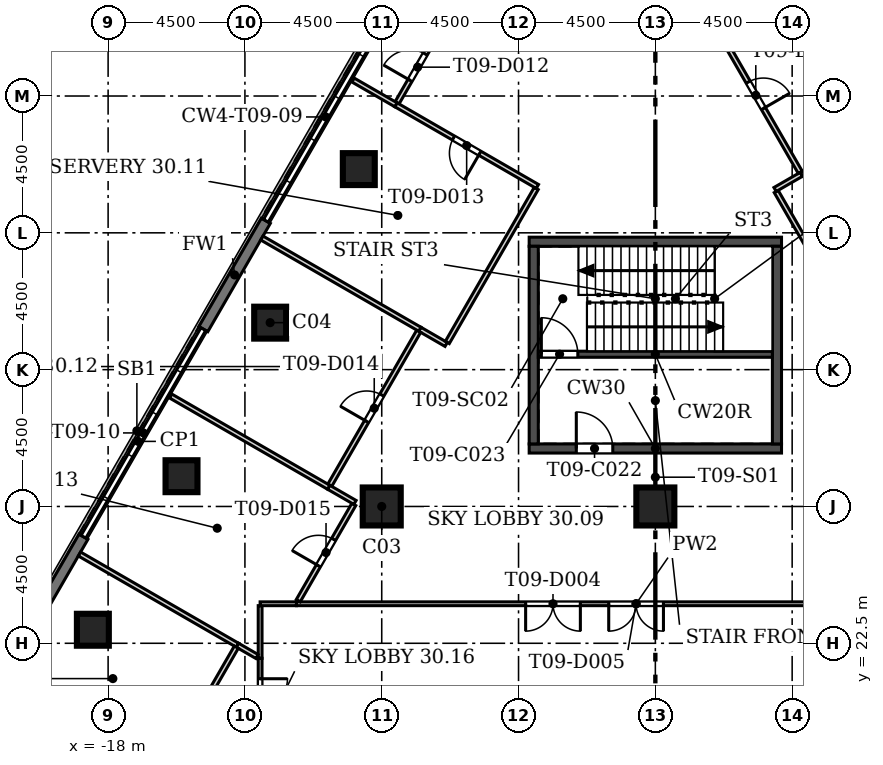
"""IFC4 building model, lengths in metres.
Left out: names, types, materials, properties, quantities, classifications, styles, units other than length and angle.
Written with IfcOpenShell. Run it as: python <this file> out.ifc"""

import sys

from ifc_helpers import new_model, si_unit, direction, frame, frame_2d, origin, origin_2d, place, context, subcontext, project, spatial, rectangle, extrude, element, fill, save


model = new_model("IFC4")
c1 = context("Model", 3, precision=1e-05, world=origin(), true_north=direction((0.0, 1.0)))
c2 = subcontext(c1, "Body", "Model", "MODEL_VIEW")
j1 = project(units=[si_unit("LENGTHUNIT", "METRE"), si_unit("PLANEANGLEUNIT", "RADIAN")], contexts=[c1])
p1 = place(None, origin())
s1 = spatial("IfcSite", under=j1, at=p1, CompositionType="ELEMENT")
p2 = place(p1, origin())
s2 = spatial("IfcBuilding", under=s1, at=p2, CompositionType="ELEMENT")
p3 = place(p2, frame((0.0, 0.0, 137.5)))
s3 = spatial("IfcBuildingStorey", under=s2, at=p3, CompositionType="ELEMENT", Elevation=137.5)
for number, where, z_axis, x_axis in (
    (1, (-9.754, 38.096, 0.0), (0.0, 0.0, 1.0), (1.0, 0.0, 0.0)),
    (2, (-12.67, 33.046, 0.0), (0.0, 0.0, 1.0), (1.0, 0.0, 0.0)),
    (3, (-15.586, 27.995, 0.0), (0.0, 0.0, 1.0), (1.0, 0.0, 0.0)),
    (4, (-18.502, 22.945, 0.0), (0.0, 0.0, 1.0), (1.0, 0.0, 0.0)),
):
    element("IfcColumn", number, at=place(p3, frame(where, z_axis=z_axis, x_axis=x_axis)), inside=s3, PredefinedType="COLUMN", context=c2, shape_type="SweptSolid", body=[
        extrude(rectangle(XDim=1.05, YDim=1.05, at=origin_2d()), origin(), (0.0, 0.0, 1.0), 5.4),
    ])
for number, where, z_axis, x_axis in (
    (5, (-9.0, 27.0, 0.0), (0.0, 0.0, 1.0), (1.0, 0.0, 0.0)),
    (6, (0.0, 27.0, 0.0), (0.0, 0.0, 1.0), (1.0, 0.0, 0.0)),
):
    element("IfcColumn", number, at=place(p3, frame(where, z_axis=z_axis, x_axis=x_axis)), inside=s3, PredefinedType="COLUMN", context=c2, shape_type="SweptSolid", body=[
        extrude(rectangle(XDim=1.25, YDim=1.25, at=origin_2d()), origin(), (0.0, 0.0, 1.0), 5.4),
    ])
for number, where, z_axis, x_axis in (
    (7, (-12.811, 36.397, 0.0), (0.0, 0.0, 1.0), (-0.5, -0.866, 0.0)),
    (8, (-18.811, 26.004, 0.0), (0.0, 0.0, 1.0), (-0.5, -0.866, 0.0)),
):
    element("IfcWall", number, at=place(p3, frame(where, z_axis=z_axis, x_axis=x_axis)), inside=s3, PredefinedType="SOLIDWALL", context=c2, shape_type="SweptSolid", body=[
        extrude(rectangle(XDim=4.115, YDim=0.34, at=frame_2d((2.058, 0.0))), origin(), (0.0, 0.0, 1.0), 5.0),
    ])
p4 = place(p3, frame((-4.15, 28.907, -0.4), z_axis=(0.0, 0.0, 1.0), x_axis=(1.0, 0.0, 0.0)))
e9 = element("IfcWall", 9, at=p4, inside=s3, PredefinedType="SOLIDWALL", context=c2, shape_type="SweptSolid", body=[
    extrude(rectangle(XDim=8.3, YDim=0.3, at=frame_2d((4.15, 0.0))), origin(), (0.0, 0.0, 1.0), 5.4),
])
p5 = place(p4, frame((1.55, 0.0, 0.4)))
e10 = element("IfcOpeningElement", 10, at=p5, cuts=e9, PredefinedType="OPENING", context=c2, shape_type="SweptSolid", body=[
    extrude(rectangle(XDim=1.2, YDim=2.1, at=frame_2d((0.6, 1.05))), frame((0.0, 0.16, 0.0), z_axis=(0.0, -1.0, 0.0), x_axis=(1.0, 0.0, 0.0)), (0.0, 0.0, 1.0), 0.32),
])
p6 = place(p3, frame((-4.15, 35.707, -0.4), z_axis=(0.0, 0.0, 1.0), x_axis=(1.0, 0.0, 0.0)))
e11 = element("IfcWall", 11, at=p6, inside=s3, PredefinedType="SOLIDWALL", context=c2, shape_type="SweptSolid", body=[
    extrude(rectangle(XDim=8.3, YDim=0.3, at=frame_2d((4.15, 0.0))), origin(), (0.0, 0.0, 1.0), 5.4),
])
for number, where, z_axis, x_axis in (
    (12, (-4.0, 29.057, -0.4), (0.0, 0.0, 1.0), (0.0, 1.0, 0.0)),
    (13, (4.0, 29.057, -0.4), (0.0, 0.0, 1.0), (0.0, 1.0, 0.0)),
):
    element("IfcWall", number, at=place(p3, frame(where, z_axis=z_axis, x_axis=x_axis)), inside=s3, PredefinedType="SOLIDWALL", context=c2, shape_type="SweptSolid", body=[
        extrude(rectangle(XDim=6.5, YDim=0.3, at=frame_2d((3.25, 0.0))), origin(), (0.0, 0.0, 1.0), 5.4),
    ])
p7 = place(p3, frame((-3.85, 32.007, -0.4), z_axis=(0.0, 0.0, 1.0), x_axis=(1.0, 0.0, 0.0)))
e14 = element("IfcWall", 14, at=p7, inside=s3, PredefinedType="SOLIDWALL", context=c2, shape_type="SweptSolid", body=[
    extrude(rectangle(XDim=7.7, YDim=0.2, at=frame_2d((3.85, 0.0))), origin(), (0.0, 0.0, 1.0), 5.4),
])
p8 = place(p7, frame((0.1, 0.0, 0.4)))
e15 = element("IfcOpeningElement", 15, at=p8, cuts=e14, PredefinedType="OPENING", context=c2, shape_type="SweptSolid", body=[
    extrude(rectangle(XDim=1.2, YDim=2.1, at=frame_2d((0.6, 1.05))), frame((0.0, 0.11, 0.0), z_axis=(0.0, -1.0, 0.0), x_axis=(1.0, 0.0, 0.0)), (0.0, 0.0, 1.0), 0.22),
])
p9 = place(p3, frame((-11.804, 23.8, 0.0), z_axis=(0.0, 0.0, 1.0), x_axis=(1.0, 0.0, 0.0)))
e16 = element("IfcWall", 16, at=p9, inside=s3, PredefinedType="PARTITIONING", context=c2, shape_type="SweptSolid", body=[
    extrude(rectangle(XDim=22.342, YDim=0.125, at=frame_2d((11.171, 0.0))), origin(), (0.0, 0.0, 1.0), 5.0),
])
p10 = place(p9, frame((7.538, 0.0, 0.0)))
e17 = element("IfcOpeningElement", 17, at=p10, cuts=e16, PredefinedType="OPENING", context=c2, shape_type="SweptSolid", body=[
    extrude(rectangle(XDim=1.8, YDim=2.1, at=frame_2d((0.9, 1.05))), frame((0.0, 0.073, 0.0), z_axis=(0.0, -1.0, 0.0), x_axis=(1.0, 0.0, 0.0)), (0.0, 0.0, 1.0), 0.145),
])
p11 = place(p9, frame((10.271, 0.0, 0.0)))
e18 = element("IfcOpeningElement", 18, at=p11, cuts=e16, PredefinedType="OPENING", context=c2, shape_type="SweptSolid", body=[
    extrude(rectangle(XDim=1.8, YDim=2.1, at=frame_2d((0.9, 1.05))), frame((0.0, 0.073, 0.0), z_axis=(0.0, -1.0, 0.0), x_axis=(1.0, 0.0, 0.0)), (0.0, 0.0, 1.0), 0.145),
])
p12 = place(p3, frame((-13.0, 22.006, 0.0), z_axis=(0.0, 0.0, 1.0), x_axis=(0.0, 1.0, 0.0)))
e19 = element("IfcWall", 19, at=p12, inside=s3, PredefinedType="PARTITIONING", context=c2, shape_type="SweptSolid", body=[
    extrude(rectangle(XDim=1.732, YDim=0.125, at=frame_2d((0.866, 0.0))), origin(), (0.0, 0.0, 1.0), 5.0),
])
p13 = place(p3, frame((-13.0, 23.8, 0.0), z_axis=(0.0, 0.0, 1.0), x_axis=(1.0, 0.0, 0.0)))
e20 = element("IfcWall", 20, at=p13, inside=s3, PredefinedType="PARTITIONING", context=c2, shape_type="SweptSolid", body=[
    extrude(rectangle(XDim=1.196, YDim=0.125, at=frame_2d((0.598, 0.0))), origin(), (0.0, 0.0, 1.0), 5.0),
])
p14 = place(p3, frame((-13.0, 18.863, 0.0), z_axis=(0.0, 0.0, 1.0), x_axis=(0.0, 1.0, 0.0)))
e21 = element("IfcWall", 21, at=p14, inside=s3, PredefinedType="PARTITIONING", context=c2, shape_type="SweptSolid", body=[
    extrude(rectangle(XDim=3.143, YDim=0.125, at=frame_2d((1.572, 0.0))), origin(), (0.0, 0.0, 1.0), 5.0),
])
p15 = place(p14, frame((0.672, 0.0, 0.0)))
e22 = element("IfcOpeningElement", 22, at=p15, cuts=e21, PredefinedType="OPENING", context=c2, shape_type="SweptSolid", body=[
    extrude(rectangle(XDim=1.8, YDim=2.1, at=frame_2d((0.9, 1.05))), frame((0.0, 0.073, 0.0), z_axis=(0.0, -1.0, 0.0), x_axis=(1.0, 0.0, 0.0)), (0.0, 0.0, 1.0), 0.145),
])
p16 = place(p3, frame((4.804, 37.925, 0.0), z_axis=(0.0, 0.0, 1.0), x_axis=(0.866031096941, 0.499990139034, 0.0)))
e23 = element("IfcWall", 23, at=p16, inside=s3, PredefinedType="PARTITIONING", context=c2, shape_type="SweptSolid", body=[
    extrude(rectangle(XDim=6.0, YDim=0.15, at=frame_2d((3.0, 0.0))), origin(), (0.0, 0.0, 1.0), 5.0),
])
p17 = place(p3, frame((6.938, 32.229, 0.0), z_axis=(0.0, 0.0, 1.0), x_axis=(-0.499994727438, 0.866028447878, 0.0)))
e24 = element("IfcWall", 24, at=p17, inside=s3, PredefinedType="PARTITIONING", context=c2, shape_type="SweptSolid", body=[
    extrude(rectangle(XDim=5.925, YDim=0.15, at=frame_2d((2.962, 0.0))), origin(), (0.0, 0.0, 1.0), 5.0),
])
p18 = place(p17, frame((2.261, 0.0, 0.0)))
e25 = element("IfcOpeningElement", 25, at=p18, cuts=e24, PredefinedType="OPENING", context=c2, shape_type="SweptSolid", body=[
    extrude(rectangle(XDim=1.0, YDim=2.1, at=frame_2d((0.5, 1.05))), frame((0.0, 0.085, 0.0), z_axis=(0.0, -1.0, 0.0), x_axis=(1.0, 0.0, 0.0)), (0.0, 0.0, 1.0), 0.17),
])
p19 = place(p3, frame((3.938, 37.425, 0.0), z_axis=(0.0, 0.0, 1.0), x_axis=(0.866010750942, 0.50002537861, 0.0)))
e26 = element("IfcWall", 26, at=p19, inside=s3, PredefinedType="PARTITIONING", context=c2, shape_type="SweptSolid", body=[
    extrude(rectangle(XDim=1.0, YDim=0.15, at=frame_2d((0.5, 0.0))), origin(), (0.0, 0.0, 1.0), 5.0),
])
p20 = place(p3, frame((4.766, 37.99, 0.0), z_axis=(0.0, 0.0, 1.0), x_axis=(-0.500012662943, 0.866018092707, 0.0)))
e27 = element("IfcWall", 27, at=p20, inside=s3, PredefinedType="PARTITIONING", context=c2, shape_type="SweptSolid", body=[
    extrude(rectangle(XDim=5.85, YDim=0.15, at=frame_2d((2.925, 0.0))), origin(), (0.0, 0.0, 1.0), 5.0),
])
p21 = place(p20, frame((2.425, 0.0, 0.0)))
e28 = element("IfcOpeningElement", 28, at=p21, cuts=e27, PredefinedType="OPENING", context=c2, shape_type="SweptSolid", body=[
    extrude(rectangle(XDim=1.0, YDim=2.1, at=frame_2d((0.5, 1.05))), frame((0.0, 0.085, 0.0), z_axis=(0.0, -1.0, 0.0), x_axis=(1.0, 0.0, 0.0)), (0.0, 0.0, 1.0), 0.17),
])
p22 = place(p3, frame((-8.496, 40.276, 0.0), z_axis=(0.0, 0.0, 1.0), x_axis=(0.500037236202, 0.866003904386, 0.0)))
e29 = element("IfcWall", 29, at=p22, inside=s3, PredefinedType="PARTITIONING", context=c2, shape_type="SweptSolid", body=[
    extrude(rectangle(XDim=2.708, YDim=0.15, at=frame_2d((1.354, 0.0))), origin(), (0.0, 0.0, 1.0), 4.2),
])
p23 = place(p22, frame((0.854, 0.0, 0.0)))
e30 = element("IfcOpeningElement", 30, at=p23, cuts=e29, PredefinedType="OPENING", context=c2, shape_type="SweptSolid", body=[
    extrude(rectangle(XDim=1.0, YDim=2.1, at=frame_2d((0.5, 1.05))), frame((0.0, 0.085, 0.0), z_axis=(0.0, -1.0, 0.0), x_axis=(1.0, 0.0, 0.0)), (0.0, 0.0, 1.0), 0.17),
])
p24 = place(p3, frame((-7.746, 32.829, 0.0), z_axis=(0.0, 0.0, 1.0), x_axis=(0.866010750942, -0.50002537861, 0.0)))
e31 = element("IfcWall", 31, at=p24, inside=s3, PredefinedType="PARTITIONING", context=c2, shape_type="SweptSolid", body=[
    extrude(rectangle(XDim=1.0, YDim=0.15, at=frame_2d((0.5, 0.0))), origin(), (0.0, 0.0, 1.0), 5.0),
])
p25 = place(p3, frame((-6.843, 32.394, 0.0), z_axis=(0.0, 0.0, 1.0), x_axis=(0.500012662943, 0.866018092707, 0.0)))
e32 = element("IfcWall", 32, at=p25, inside=s3, PredefinedType="PARTITIONING", context=c2, shape_type="SweptSolid", body=[
    extrude(rectangle(XDim=5.85, YDim=0.15, at=frame_2d((2.925, 0.0))), origin(), (0.0, 0.0, 1.0), 5.0),
])
p26 = place(p3, frame((-3.88, 37.525, 0.0), z_axis=(0.0, 0.0, 1.0), x_axis=(-0.866016825791, 0.500014857227, 0.0)))
e33 = element("IfcWall", 33, at=p26, inside=s3, PredefinedType="PARTITIONING", context=c2, shape_type="SweptSolid", body=[
    extrude(rectangle(XDim=5.372, YDim=0.15, at=frame_2d((2.686, 0.0))), origin(), (0.0, 0.0, 1.0), 5.0),
])
p27 = place(p26, frame((2.186, 0.0, 0.0)))
e34 = element("IfcOpeningElement", 34, at=p27, cuts=e33, PredefinedType="OPENING", context=c2, shape_type="SweptSolid", body=[
    extrude(rectangle(XDim=1.0, YDim=2.1, at=frame_2d((0.5, 1.05))), frame((0.0, 0.085, 0.0), z_axis=(0.0, -1.0, 0.0), x_axis=(1.0, 0.0, 0.0)), (0.0, 0.0, 1.0), 0.17),
])
p28 = place(p3, frame((-10.709, 27.698, 0.0), z_axis=(0.0, 0.0, 1.0), x_axis=(0.500012662943, 0.866018092707, 0.0)))
e35 = element("IfcWall", 35, at=p28, inside=s3, PredefinedType="PARTITIONING", context=c2, shape_type="SweptSolid", body=[
    extrude(rectangle(XDim=5.85, YDim=0.15, at=frame_2d((2.925, 0.0))), origin(), (0.0, 0.0, 1.0), 5.0),
])
p29 = place(p28, frame((2.425, 0.0, 0.0)))
e36 = element("IfcOpeningElement", 36, at=p29, cuts=e35, PredefinedType="OPENING", context=c2, shape_type="SweptSolid", body=[
    extrude(rectangle(XDim=1.0, YDim=2.1, at=frame_2d((0.5, 1.05))), frame((0.0, 0.085, 0.0), z_axis=(0.0, -1.0, 0.0), x_axis=(1.0, 0.0, 0.0)), (0.0, 0.0, 1.0), 0.17),
])
p30 = place(p3, frame((-11.746, 23.9, 0.0), z_axis=(0.0, 0.0, 1.0), x_axis=(0.500001750229, 0.866024393287, 0.0)))
e37 = element("IfcWall", 37, at=p30, inside=s3, PredefinedType="PARTITIONING", context=c2, shape_type="SweptSolid", body=[
    extrude(rectangle(XDim=3.657, YDim=0.15, at=frame_2d((1.829, 0.0))), origin(), (0.0, 0.0, 1.0), 5.0),
])
p31 = place(p30, frame((1.329, 0.0, 0.0)))
e38 = element("IfcOpeningElement", 38, at=p31, cuts=e37, PredefinedType="OPENING", context=c2, shape_type="SweptSolid", body=[
    extrude(rectangle(XDim=1.0, YDim=2.1, at=frame_2d((0.5, 1.05))), frame((0.0, 0.085, 0.0), z_axis=(0.0, -1.0, 0.0), x_axis=(1.0, 0.0, 0.0)), (0.0, 0.0, 1.0), 0.17),
])
p32 = place(p3, frame((-9.88, 27.133, 0.0), z_axis=(0.0, 0.0, 1.0), x_axis=(-0.866010750942, 0.50002537861, 0.0)))
e39 = element("IfcWall", 39, at=p32, inside=s3, PredefinedType="PARTITIONING", context=c2, shape_type="SweptSolid", body=[
    extrude(rectangle(XDim=1.0, YDim=0.15, at=frame_2d((0.5, 0.0))), origin(), (0.0, 0.0, 1.0), 5.0),
])
p33 = place(p3, frame((-8.533, 40.211, 0.0), z_axis=(0.0, 0.0, 1.0), x_axis=(-0.866028203713, 0.499995150351, 0.0)))
e40 = element("IfcWall", 40, at=p33, inside=s3, PredefinedType="PARTITIONING", context=c2, shape_type="SweptSolid", body=[
    extrude(rectangle(XDim=1.627, YDim=0.15, at=frame_2d((0.814, 0.0))), origin(), (0.0, 0.0, 1.0), 5.0),
])
for number, where, z_axis, x_axis in (
    (41, (-7.746, 32.829, 0.0), (0.0, 0.0, 1.0), (-0.866, 0.5, 0.0)),
    (42, (-10.746, 27.633, 0.0), (0.0, 0.0, 1.0), (-0.866, 0.5, 0.0)),
    (43, (-13.746, 22.437, 0.0), (0.0, 0.0, 1.0), (-0.866, 0.5, 0.0)),
):
    element("IfcWall", number, at=place(p3, frame(where, z_axis=z_axis, x_axis=x_axis)), inside=s3, PredefinedType="PARTITIONING", context=c2, shape_type="SweptSolid", body=[
        extrude(rectangle(XDim=6.0, YDim=0.15, at=frame_2d((3.0, 0.0))), origin(), (0.0, 0.0, 1.0), 5.0),
    ])
p34 = place(p3, frame((-13.1, 22.064, 0.0), z_axis=(0.0, 0.0, 1.0), x_axis=(-0.866120184914, 0.499835798323, 0.0)))
e44 = element("IfcWall", 44, at=p34, inside=s3, PredefinedType="PARTITIONING", context=c2, shape_type="SweptSolid", body=[
    extrude(rectangle(XDim=0.746, YDim=0.15, at=frame_2d((0.373, 0.0))), origin(), (0.0, 0.0, 1.0), 5.0),
])
p35 = place(p3, frame((-13.784, 22.372, 0.0), z_axis=(0.0, 0.0, 1.0), x_axis=(-0.500012662943, -0.866018092707, 0.0)))
e45 = element("IfcWall", 45, at=p35, inside=s3, PredefinedType="PARTITIONING", context=c2, shape_type="SweptSolid", body=[
    extrude(rectangle(XDim=5.85, YDim=0.15, at=frame_2d((2.925, 0.0))), origin(), (0.0, 0.0, 1.0), 5.0),
])
p36 = place(p35, frame((2.425, 0.0, 0.0)))
e46 = element("IfcOpeningElement", 46, at=p36, cuts=e45, PredefinedType="OPENING", context=c2, shape_type="SweptSolid", body=[
    extrude(rectangle(XDim=1.0, YDim=2.1, at=frame_2d((0.5, 1.05))), frame((0.0, 0.085, 0.0), z_axis=(0.0, -1.0, 0.0), x_axis=(1.0, 0.0, 0.0)), (0.0, 0.0, 1.0), 0.17),
])
p37 = place(p5, origin())
e47 = element("IfcDoor", 47, at=p37, inside=s3, OperationType="SINGLE_SWING_LEFT", PredefinedType="DOOR", context=c2, shape_type="SweptSolid", body=[
    extrude(rectangle(XDim=1.2, YDim=2.1, at=frame_2d((0.6, 1.05))), frame((0.0, 0.025, 0.0), z_axis=(0.0, -1.0, 0.0), x_axis=(1.0, 0.0, 0.0)), (0.0, 0.0, 1.0), 0.05),
])
fill(e10, e47)
p38 = place(p8, origin())
e48 = element("IfcDoor", 48, at=p38, inside=s3, OperationType="SINGLE_SWING_LEFT", PredefinedType="DOOR", context=c2, shape_type="SweptSolid", body=[
    extrude(rectangle(XDim=1.2, YDim=2.1, at=frame_2d((0.6, 1.05))), frame((0.0, 0.025, 0.0), z_axis=(0.0, -1.0, 0.0), x_axis=(1.0, 0.0, 0.0)), (0.0, 0.0, 1.0), 0.05),
])
fill(e15, e48)
p39 = place(p10, frame((1.8, 0.0, 0.0), z_axis=(0.0, 0.0, 1.0), x_axis=(-1.0, 0.0, 0.0)))
e49 = element("IfcDoor", 49, at=p39, inside=s3, OperationType="DOUBLE_DOOR_SINGLE_SWING", PredefinedType="DOOR", context=c2, shape_type="SweptSolid", body=[
    extrude(rectangle(XDim=1.8, YDim=2.1, at=frame_2d((0.9, 1.05))), frame((0.0, 0.025, 0.0), z_axis=(0.0, -1.0, 0.0), x_axis=(1.0, 0.0, 0.0)), (0.0, 0.0, 1.0), 0.05),
])
fill(e17, e49)
p40 = place(p11, frame((1.8, 0.0, 0.0), z_axis=(0.0, 0.0, 1.0), x_axis=(-1.0, 0.0, 0.0)))
e50 = element("IfcDoor", 50, at=p40, inside=s3, OperationType="DOUBLE_DOOR_SINGLE_SWING", PredefinedType="DOOR", context=c2, shape_type="SweptSolid", body=[
    extrude(rectangle(XDim=1.8, YDim=2.1, at=frame_2d((0.9, 1.05))), frame((0.0, 0.025, 0.0), z_axis=(0.0, -1.0, 0.0), x_axis=(1.0, 0.0, 0.0)), (0.0, 0.0, 1.0), 0.05),
])
fill(e18, e50)
p41 = place(p15, frame((1.8, 0.0, 0.0), z_axis=(0.0, 0.0, 1.0), x_axis=(-1.0, 0.0, 0.0)))
e51 = element("IfcDoor", 51, at=p41, inside=s3, OperationType="DOUBLE_DOOR_SINGLE_SWING", PredefinedType="DOOR", context=c2, shape_type="SweptSolid", body=[
    extrude(rectangle(XDim=1.8, YDim=2.1, at=frame_2d((0.9, 1.05))), frame((0.0, 0.025, 0.0), z_axis=(0.0, -1.0, 0.0), x_axis=(1.0, 0.0, 0.0)), (0.0, 0.0, 1.0), 0.05),
])
fill(e22, e51)
p42 = place(p21, frame((1.0, 0.0, 0.0), z_axis=(0.0, 0.0, 1.0), x_axis=(-1.0, 0.0, 0.0)))
e52 = element("IfcDoor", 52, at=p42, inside=s3, OperationType="SINGLE_SWING_RIGHT", PredefinedType="DOOR", context=c2, shape_type="SweptSolid", body=[
    extrude(rectangle(XDim=1.0, YDim=2.1, at=frame_2d((0.5, 1.05))), frame((0.0, 0.025, 0.0), z_axis=(0.0, -1.0, 0.0), x_axis=(1.0, 0.0, 0.0)), (0.0, 0.0, 1.0), 0.05),
])
fill(e28, e52)
p43 = place(p23, origin())
e53 = element("IfcDoor", 53, at=p43, inside=s3, OperationType="SINGLE_SWING_LEFT", PredefinedType="DOOR", context=c2, shape_type="SweptSolid", body=[
    extrude(rectangle(XDim=1.0, YDim=2.1, at=frame_2d((0.5, 1.05))), frame((0.0, 0.025, 0.0), z_axis=(0.0, -1.0, 0.0), x_axis=(1.0, 0.0, 0.0)), (0.0, 0.0, 1.0), 0.05),
])
fill(e30, e53)
p44 = place(p27, origin())
e54 = element("IfcDoor", 54, at=p44, inside=s3, OperationType="SINGLE_SWING_LEFT", PredefinedType="DOOR", context=c2, shape_type="SweptSolid", body=[
    extrude(rectangle(XDim=1.0, YDim=2.1, at=frame_2d((0.5, 1.05))), frame((0.0, 0.025, 0.0), z_axis=(0.0, -1.0, 0.0), x_axis=(1.0, 0.0, 0.0)), (0.0, 0.0, 1.0), 0.05),
])
fill(e34, e54)
p45 = place(p29, origin())
e55 = element("IfcDoor", 55, at=p45, inside=s3, OperationType="SINGLE_SWING_LEFT", PredefinedType="DOOR", context=c2, shape_type="SweptSolid", body=[
    extrude(rectangle(XDim=1.0, YDim=2.1, at=frame_2d((0.5, 1.05))), frame((0.0, 0.025, 0.0), z_axis=(0.0, -1.0, 0.0), x_axis=(1.0, 0.0, 0.0)), (0.0, 0.0, 1.0), 0.05),
])
fill(e36, e55)
p46 = place(p31, origin())
e56 = element("IfcDoor", 56, at=p46, inside=s3, OperationType="SINGLE_SWING_LEFT", PredefinedType="DOOR", context=c2, shape_type="SweptSolid", body=[
    extrude(rectangle(XDim=1.0, YDim=2.1, at=frame_2d((0.5, 1.05))), frame((0.0, 0.025, 0.0), z_axis=(0.0, -1.0, 0.0), x_axis=(1.0, 0.0, 0.0)), (0.0, 0.0, 1.0), 0.05),
])
fill(e38, e56)
save(model, sys.argv[1])
